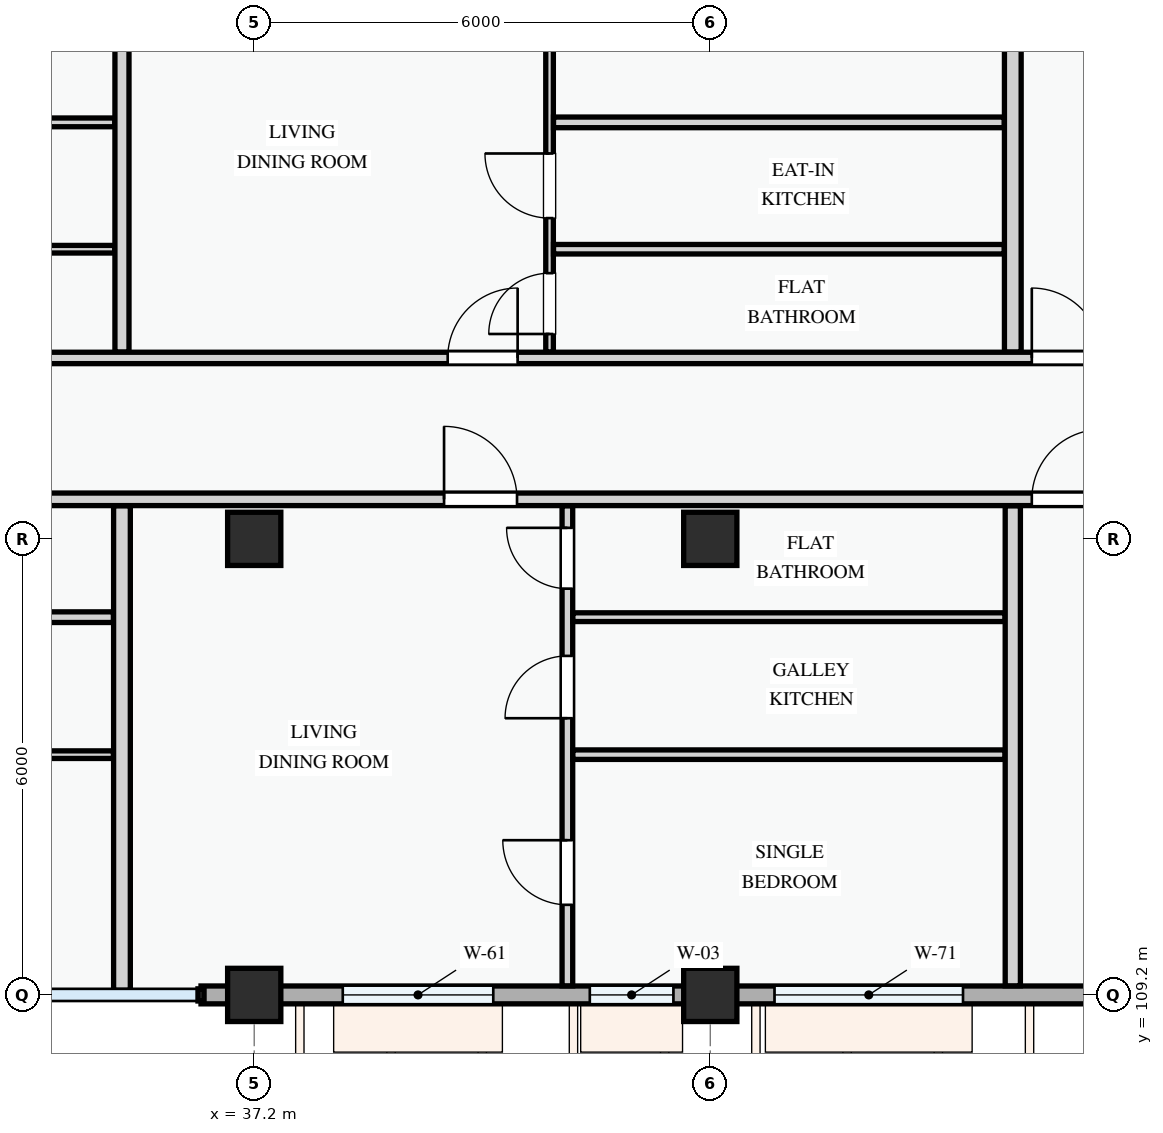
"""IFC4 building model, lengths in metres.
Left out: names, types, materials, properties, quantities, classifications, styles, units other than length and angle.
Written with IfcOpenShell. Run it as: python <this file> out.ifc"""

import sys

from ifc_helpers import new_model, si_unit, direction, frame, frame_2d, origin, origin_2d, place, context, subcontext, project, spatial, rectangle, extrude, element, fill, save


model = new_model("IFC4")
c1 = context("Model", 3, precision=1e-05, world=origin(), true_north=direction((0.0, 1.0)))
c2 = subcontext(c1, "Body", "Model", "MODEL_VIEW")
j1 = project(units=[si_unit("LENGTHUNIT", "METRE"), si_unit("PLANEANGLEUNIT", "RADIAN")], contexts=[c1])
p1 = place(None, origin())
s1 = spatial("IfcSite", under=j1, at=p1, CompositionType="ELEMENT")
p2 = place(p1, origin())
s2 = spatial("IfcBuilding", under=s1, at=p2, CompositionType="ELEMENT")
p3 = place(p2, frame((0.0, 0.0, 11.4)))
s3 = spatial("IfcBuildingStorey", under=s2, at=p3, CompositionType="ELEMENT", Elevation=11.4)
for number, where, z_axis, x_axis in (
    (1, (37.2, 109.2, 0.0), (0.0, 0.0, 1.0), (1.0, 0.0, 0.0)),
    (2, (37.2, 115.2, 0.0), (0.0, 0.0, 1.0), (1.0, 0.0, 0.0)),
    (3, (43.2, 109.2, 0.0), (0.0, 0.0, 1.0), (1.0, 0.0, 0.0)),
    (4, (43.2, 115.2, 0.0), (0.0, 0.0, 1.0), (1.0, 0.0, 0.0)),
):
    element("IfcColumn", number, at=place(p3, frame(where, z_axis=z_axis, x_axis=x_axis)), inside=s3, PredefinedType="COLUMN", context=c2, shape_type="SweptSolid", body=[
        extrude(rectangle(XDim=0.7, YDim=0.7, at=origin_2d()), origin(), (0.0, 0.0, 1.0), 3.3),
    ])
p4 = place(p3, frame((36.5, 109.2, 0.0), z_axis=(0.0, 0.0, 1.0), x_axis=(1.0, 0.0, 0.0)))
e5 = element("IfcWall", 5, at=p4, inside=s3, PredefinedType="STANDARD", context=c2, shape_type="SweptSolid", body=[
    extrude(rectangle(XDim=0.7, YDim=0.235, at=frame_2d((0.35, 0.0))), origin(), (0.0, 0.0, 1.0), 2.375),
])
p5 = place(p3, frame((37.2, 109.2, 0.0), z_axis=(0.0, 0.0, 1.0), x_axis=(1.0, 0.0, 0.0)))
e6 = element("IfcWall", 6, at=p5, inside=s3, PredefinedType="STANDARD", context=c2, shape_type="SweptSolid", body=[
    extrude(rectangle(XDim=6.0, YDim=0.235, at=frame_2d((3.0, 0.0))), origin(), (0.0, 0.0, 1.0), 2.475),
])
p6 = place(p5, frame((1.165, 0.0, 0.78)))
e7 = element("IfcOpeningElement", 7, at=p6, cuts=e6, PredefinedType="OPENING", context=c2, shape_type="SweptSolid", body=[
    extrude(rectangle(XDim=1.98, YDim=1.5, at=frame_2d((0.99, 0.75))), frame((0.0, 0.127, 0.0), z_axis=(0.0, -1.0, 0.0), x_axis=(1.0, 0.0, 0.0)), (0.0, 0.0, 1.0), 0.255),
])
p7 = place(p5, frame((4.415, 0.0, 0.78)))
e8 = element("IfcOpeningElement", 8, at=p7, cuts=e6, PredefinedType="OPENING", context=c2, shape_type="SweptSolid", body=[
    extrude(rectangle(XDim=1.1, YDim=1.3, at=frame_2d((0.55, 0.65))), frame((0.0, 0.127, 0.0), z_axis=(0.0, -1.0, 0.0), x_axis=(1.0, 0.0, 0.0)), (0.0, 0.0, 1.0), 0.255),
])
p8 = place(p3, frame((43.2, 109.2, 0.0), z_axis=(0.0, 0.0, 1.0), x_axis=(1.0, 0.0, 0.0)))
e9 = element("IfcWall", 9, at=p8, inside=s3, PredefinedType="STANDARD", context=c2, shape_type="SweptSolid", body=[
    extrude(rectangle(XDim=8.4, YDim=0.235, at=frame_2d((4.2, 0.0))), origin(), (0.0, 0.0, 1.0), 2.375),
])
p9 = place(p8, frame((0.845, 0.0, 0.78)))
e10 = element("IfcOpeningElement", 10, at=p9, cuts=e9, PredefinedType="OPENING", context=c2, shape_type="SweptSolid", body=[
    extrude(rectangle(XDim=2.48, YDim=1.46, at=frame_2d((1.24, 0.73))), frame((0.0, 0.127, 0.0), z_axis=(0.0, -1.0, 0.0), x_axis=(1.0, 0.0, 0.0)), (0.0, 0.0, 1.0), 0.255),
])
p10 = place(p8, frame((5.495, 0.0, 0.78)))
e11 = element("IfcOpeningElement", 11, at=p10, cuts=e9, PredefinedType="OPENING", context=c2, shape_type="SweptSolid", body=[
    extrude(rectangle(XDim=1.2, YDim=1.35, at=frame_2d((0.6, 0.675))), frame((0.0, 0.127, 0.0), z_axis=(0.0, -1.0, 0.0), x_axis=(1.0, 0.0, 0.0)), (0.0, 0.0, 1.0), 0.255),
])
p11 = place(p3, frame((30.665, 112.361, 0.0), z_axis=(0.0, 0.0, 1.0), x_axis=(1.0, 0.0, 0.0)))
e12 = element("IfcWall", 12, at=p11, inside=s3, PredefinedType="PARTITIONING", context=c2, shape_type="SweptSolid", body=[
    extrude(rectangle(XDim=4.683, YDim=0.1, at=frame_2d((2.342, 0.0))), origin(), (0.0, 0.0, 1.0), 3.0),
])
p12 = place(p3, frame((30.665, 114.17, 0.0), z_axis=(0.0, 0.0, 1.0), x_axis=(1.0, 0.0, 0.0)))
e13 = element("IfcWall", 13, at=p12, inside=s3, PredefinedType="PARTITIONING", context=c2, shape_type="SweptSolid", body=[
    extrude(rectangle(XDim=4.683, YDim=0.14, at=frame_2d((2.342, 0.0))), origin(), (0.0, 0.0, 1.0), 3.0),
])
p13 = place(p3, frame((30.663, 120.679, 0.0), z_axis=(0.0, 0.0, 1.0), x_axis=(1.0, 0.0, 0.0)))
e14 = element("IfcWall", 14, at=p13, inside=s3, PredefinedType="PARTITIONING", context=c2, shape_type="SweptSolid", body=[
    extrude(rectangle(XDim=4.702, YDim=0.115, at=frame_2d((2.351, 0.0))), origin(), (0.0, 0.0, 1.0), 3.0),
])
p14 = place(p3, frame((30.663, 119.01, 0.0), z_axis=(0.0, 0.0, 1.0), x_axis=(1.0, 0.0, 0.0)))
e15 = element("IfcWall", 15, at=p14, inside=s3, PredefinedType="PARTITIONING", context=c2, shape_type="SweptSolid", body=[
    extrude(rectangle(XDim=4.702, YDim=0.1, at=frame_2d((2.351, 0.0))), origin(), (0.0, 0.0, 1.0), 3.0),
])
p15 = place(p3, frame((41.32, 109.32, 0.0), z_axis=(0.0, 0.0, 1.0), x_axis=(0.0, 1.0, 0.0)))
e16 = element("IfcWall", 16, at=p15, inside=s3, PredefinedType="PARTITIONING", context=c2, shape_type="SweptSolid", body=[
    extrude(rectangle(XDim=6.316, YDim=0.14, at=frame_2d((3.158, 0.0))), origin(), (0.0, 0.0, 1.0), 3.0),
])
p16 = place(p15, frame((1.066, 0.0, 0.0)))
e17 = element("IfcOpeningElement", 17, at=p16, cuts=e16, PredefinedType="OPENING", context=c2, shape_type="SweptSolid", body=[
    extrude(rectangle(XDim=0.85, YDim=2.1, at=frame_2d((0.425, 1.05))), frame((0.0, 0.08, 0.0), z_axis=(0.0, -1.0, 0.0), x_axis=(1.0, 0.0, 0.0)), (0.0, 0.0, 1.0), 0.16),
])
p17 = place(p15, frame((3.521, 0.0, 0.0)))
e18 = element("IfcOpeningElement", 18, at=p17, cuts=e16, PredefinedType="OPENING", context=c2, shape_type="SweptSolid", body=[
    extrude(rectangle(XDim=0.82, YDim=2.08, at=frame_2d((0.41, 1.04))), frame((0.0, 0.08, 0.0), z_axis=(0.0, -1.0, 0.0), x_axis=(1.0, 0.0, 0.0)), (0.0, 0.0, 1.0), 0.16),
])
p18 = place(p15, frame((5.225, 0.0, 0.0)))
e19 = element("IfcOpeningElement", 19, at=p18, cuts=e16, PredefinedType="OPENING", context=c2, shape_type="SweptSolid", body=[
    extrude(rectangle(XDim=0.8, YDim=2.1, at=frame_2d((0.4, 1.05))), frame((0.0, 0.08, 0.0), z_axis=(0.0, -1.0, 0.0), x_axis=(1.0, 0.0, 0.0)), (0.0, 0.0, 1.0), 0.16),
])
p19 = place(p3, frame((41.392, 112.361, 0.0), z_axis=(0.0, 0.0, 1.0), x_axis=(1.0, 0.0, 0.0)))
e20 = element("IfcWall", 20, at=p19, inside=s3, PredefinedType="PARTITIONING", context=c2, shape_type="SweptSolid", body=[
    extrude(rectangle(XDim=5.686, YDim=0.125, at=frame_2d((2.843, 0.0))), origin(), (0.0, 0.0, 1.0), 3.0),
])
p20 = place(p3, frame((41.392, 114.17, 0.0), z_axis=(0.0, 0.0, 1.0), x_axis=(1.0, 0.0, 0.0)))
e21 = element("IfcWall", 21, at=p20, inside=s3, PredefinedType="PARTITIONING", context=c2, shape_type="SweptSolid", body=[
    extrude(rectangle(XDim=5.686, YDim=0.115, at=frame_2d((2.843, 0.0))), origin(), (0.0, 0.0, 1.0), 3.0),
])
p21 = place(p3, frame((41.086, 117.657, 0.0), z_axis=(0.0, 0.0, 1.0), x_axis=(0.0, 1.0, 0.0)))
e22 = element("IfcWall", 22, at=p21, inside=s3, PredefinedType="PARTITIONING", context=c2, shape_type="SweptSolid", body=[
    extrude(rectangle(XDim=5.823, YDim=0.1, at=frame_2d((2.912, 0.0))), origin(), (0.0, 0.0, 1.0), 3.0),
])
p22 = place(p21, frame((0.238, 0.0, 0.0)))
e23 = element("IfcOpeningElement", 23, at=p22, cuts=e22, PredefinedType="OPENING", context=c2, shape_type="SweptSolid", body=[
    extrude(rectangle(XDim=0.8, YDim=2.1, at=frame_2d((0.4, 1.05))), frame((0.0, 0.06, 0.0), z_axis=(0.0, -1.0, 0.0), x_axis=(1.0, 0.0, 0.0)), (0.0, 0.0, 1.0), 0.12),
])
p23 = place(p21, frame((1.763, 0.0, 0.0)))
e24 = element("IfcOpeningElement", 24, at=p23, cuts=e22, PredefinedType="OPENING", context=c2, shape_type="SweptSolid", body=[
    extrude(rectangle(XDim=0.85, YDim=2.1, at=frame_2d((0.425, 1.05))), frame((0.0, 0.06, 0.0), z_axis=(0.0, -1.0, 0.0), x_axis=(1.0, 0.0, 0.0)), (0.0, 0.0, 1.0), 0.12),
])
p24 = place(p21, frame((4.028, 0.0, 0.0)))
e25 = element("IfcOpeningElement", 25, at=p24, cuts=e22, PredefinedType="OPENING", context=c2, shape_type="SweptSolid", body=[
    extrude(rectangle(XDim=0.82, YDim=2.08, at=frame_2d((0.41, 1.04))), frame((0.0, 0.06, 0.0), z_axis=(0.0, -1.0, 0.0), x_axis=(1.0, 0.0, 0.0)), (0.0, 0.0, 1.0), 0.12),
])
p25 = place(p3, frame((41.138, 120.679, 0.0), z_axis=(0.0, 0.0, 1.0), x_axis=(1.0, 0.0, 0.0)))
e26 = element("IfcWall", 26, at=p25, inside=s3, PredefinedType="PARTITIONING", context=c2, shape_type="SweptSolid", body=[
    extrude(rectangle(XDim=5.93, YDim=0.14, at=frame_2d((2.965, 0.0))), origin(), (0.0, 0.0, 1.0), 3.0),
])
p26 = place(p3, frame((41.138, 119.01, 0.0), z_axis=(0.0, 0.0, 1.0), x_axis=(1.0, 0.0, 0.0)))
e27 = element("IfcWall", 27, at=p26, inside=s3, PredefinedType="PARTITIONING", context=c2, shape_type="SweptSolid", body=[
    extrude(rectangle(XDim=5.93, YDim=0.125, at=frame_2d((2.965, 0.0))), origin(), (0.0, 0.0, 1.0), 3.0),
])
p27 = place(p3, frame((35.46, 109.26, 0.0), z_axis=(0.0, 0.0, 1.0), x_axis=(0.0, 1.0, 0.0)))
e28 = element("IfcWall", 28, at=p27, inside=s3, PredefinedType="PARTITIONING", context=c2, shape_type="SweptSolid", body=[
    extrude(rectangle(XDim=6.375, YDim=0.22, at=frame_2d((3.188, 0.0))), origin(), (0.0, 0.0, 1.0), 3.0),
])
p28 = place(p3, frame((35.46, 117.657, 0.0), z_axis=(0.0, 0.0, 1.0), x_axis=(0.0, 1.0, 0.0)))
e29 = element("IfcWall", 29, at=p28, inside=s3, PredefinedType="PARTITIONING", context=c2, shape_type="SweptSolid", body=[
    extrude(rectangle(XDim=5.823, YDim=0.185, at=frame_2d((2.912, 0.0))), origin(), (0.0, 0.0, 1.0), 3.0),
])
p29 = place(p3, frame((47.18, 109.32, 0.0), z_axis=(0.0, 0.0, 1.0), x_axis=(0.0, 1.0, 0.0)))
e30 = element("IfcWall", 30, at=p29, inside=s3, PredefinedType="PARTITIONING", context=c2, shape_type="SweptSolid", body=[
    extrude(rectangle(XDim=6.316, YDim=0.2, at=frame_2d((3.158, 0.0))), origin(), (0.0, 0.0, 1.0), 2.585),
])
p30 = place(p3, frame((47.18, 117.657, 0.0), z_axis=(0.0, 0.0, 1.0), x_axis=(0.0, 1.0, 0.0)))
e31 = element("IfcWall", 31, at=p30, inside=s3, PredefinedType="PARTITIONING", context=c2, shape_type="SweptSolid", body=[
    extrude(rectangle(XDim=5.823, YDim=0.22, at=frame_2d((2.912, 0.0))), origin(), (0.0, 0.0, 1.0), 2.585),
])
p31 = place(p3, frame((25.15, 115.72, 0.0), z_axis=(0.0, 0.0, 1.0), x_axis=(1.0, 0.0, 0.0)))
e32 = element("IfcWall", 32, at=p31, inside=s3, PredefinedType="PARTITIONING", context=c2, shape_type="SweptSolid", body=[
    extrude(rectangle(XDim=32.331, YDim=0.165, at=frame_2d((16.165, 0.0))), origin(), (0.0, 0.0, 1.0), 3.0),
])
p32 = place(p31, frame((0.25, 0.0, 0.0)))
e33 = element("IfcOpeningElement", 33, at=p32, cuts=e32, PredefinedType="OPENING", context=c2, shape_type="SweptSolid", body=[
    extrude(rectangle(XDim=0.92, YDim=2.1, at=frame_2d((0.46, 1.05))), frame((0.0, 0.093, 0.0), z_axis=(0.0, -1.0, 0.0), x_axis=(1.0, 0.0, 0.0)), (0.0, 0.0, 1.0), 0.185),
])
p33 = place(p31, frame((14.548, 0.0, 0.0)))
e34 = element("IfcOpeningElement", 34, at=p33, cuts=e32, PredefinedType="OPENING", context=c2, shape_type="SweptSolid", body=[
    extrude(rectangle(XDim=0.96, YDim=2.12, at=frame_2d((0.48, 1.06))), frame((0.0, 0.093, 0.0), z_axis=(0.0, -1.0, 0.0), x_axis=(1.0, 0.0, 0.0)), (0.0, 0.0, 1.0), 0.185),
])
p34 = place(p31, frame((22.28, 0.0, 0.0)))
e35 = element("IfcOpeningElement", 35, at=p34, cuts=e32, PredefinedType="OPENING", context=c2, shape_type="SweptSolid", body=[
    extrude(rectangle(XDim=0.92, YDim=2.1, at=frame_2d((0.46, 1.05))), frame((0.0, 0.093, 0.0), z_axis=(0.0, -1.0, 0.0), x_axis=(1.0, 0.0, 0.0)), (0.0, 0.0, 1.0), 0.185),
])
p35 = place(p3, frame((22.66, 117.58, 0.0), z_axis=(0.0, 0.0, 1.0), x_axis=(1.0, 0.0, 0.0)))
e36 = element("IfcWall", 36, at=p35, inside=s3, PredefinedType="PARTITIONING", context=c2, shape_type="SweptSolid", body=[
    extrude(rectangle(XDim=34.88, YDim=0.15, at=frame_2d((17.44, 0.0))), origin(), (0.0, 0.0, 1.0), 3.0),
])
p36 = place(p35, frame((2.74, 0.0, 0.0)))
e37 = element("IfcOpeningElement", 37, at=p36, cuts=e36, PredefinedType="OPENING", context=c2, shape_type="SweptSolid", body=[
    extrude(rectangle(XDim=0.92, YDim=2.1, at=frame_2d((0.46, 1.05))), frame((0.0, 0.085, 0.0), z_axis=(0.0, -1.0, 0.0), x_axis=(1.0, 0.0, 0.0)), (0.0, 0.0, 1.0), 0.17),
])
p37 = place(p35, frame((17.085, 0.0, 0.0)))
e38 = element("IfcOpeningElement", 38, at=p37, cuts=e36, PredefinedType="OPENING", context=c2, shape_type="SweptSolid", body=[
    extrude(rectangle(XDim=0.92, YDim=2.1, at=frame_2d((0.46, 1.05))), frame((0.0, 0.085, 0.0), z_axis=(0.0, -1.0, 0.0), x_axis=(1.0, 0.0, 0.0)), (0.0, 0.0, 1.0), 0.17),
])
p38 = place(p35, frame((24.77, 0.0, 0.0)))
e39 = element("IfcOpeningElement", 39, at=p38, cuts=e36, PredefinedType="OPENING", context=c2, shape_type="SweptSolid", body=[
    extrude(rectangle(XDim=0.92, YDim=2.1, at=frame_2d((0.46, 1.05))), frame((0.0, 0.085, 0.0), z_axis=(0.0, -1.0, 0.0), x_axis=(1.0, 0.0, 0.0)), (0.0, 0.0, 1.0), 0.17),
])
p39 = place(p6, origin())
e40 = element("IfcWindow", 40, at=p39, inside=s3, PartitioningType="DOUBLE_PANEL_VERTICAL", PredefinedType="WINDOW", context=c2, shape_type="SweptSolid", body=[
    extrude(rectangle(XDim=1.98, YDim=1.5, at=frame_2d((0.99, 0.75))), frame((0.0, 0.03, 0.0), z_axis=(0.0, -1.0, 0.0), x_axis=(1.0, 0.0, 0.0)), (0.0, 0.0, 1.0), 0.06),
])
fill(e7, e40)
p40 = place(p7, origin())
e41 = element("IfcWindow", 41, at=p40, inside=s3, PartitioningType="SINGLE_PANEL", PredefinedType="WINDOW", context=c2, shape_type="SweptSolid", body=[
    extrude(rectangle(XDim=1.1, YDim=1.3, at=frame_2d((0.55, 0.65))), frame((0.0, 0.03, 0.0), z_axis=(0.0, -1.0, 0.0), x_axis=(1.0, 0.0, 0.0)), (0.0, 0.0, 1.0), 0.06),
])
fill(e8, e41)
p41 = place(p9, origin())
e42 = element("IfcWindow", 42, at=p41, inside=s3, PartitioningType="DOUBLE_PANEL_VERTICAL", PredefinedType="WINDOW", context=c2, shape_type="SweptSolid", body=[
    extrude(rectangle(XDim=2.48, YDim=1.46, at=frame_2d((1.24, 0.73))), frame((0.0, 0.03, 0.0), z_axis=(0.0, -1.0, 0.0), x_axis=(1.0, 0.0, 0.0)), (0.0, 0.0, 1.0), 0.06),
])
fill(e10, e42)
p42 = place(p16, origin())
e43 = element("IfcDoor", 43, at=p42, inside=s3, OperationType="SINGLE_SWING_RIGHT", PredefinedType="DOOR", context=c2, shape_type="SweptSolid", body=[
    extrude(rectangle(XDim=0.85, YDim=2.1, at=frame_2d((0.425, 1.05))), frame((0.0, 0.025, 0.0), z_axis=(0.0, -1.0, 0.0), x_axis=(1.0, 0.0, 0.0)), (0.0, 0.0, 1.0), 0.05),
])
fill(e17, e43)
p43 = place(p17, origin())
e44 = element("IfcDoor", 44, at=p43, inside=s3, OperationType="SINGLE_SWING_LEFT", PredefinedType="DOOR", context=c2, shape_type="SweptSolid", body=[
    extrude(rectangle(XDim=0.82, YDim=2.08, at=frame_2d((0.41, 1.04))), frame((0.0, 0.025, 0.0), z_axis=(0.0, -1.0, 0.0), x_axis=(1.0, 0.0, 0.0)), (0.0, 0.0, 1.0), 0.05),
])
fill(e18, e44)
p44 = place(p18, origin())
e45 = element("IfcDoor", 45, at=p44, inside=s3, OperationType="SINGLE_SWING_RIGHT", PredefinedType="DOOR", context=c2, shape_type="SweptSolid", body=[
    extrude(rectangle(XDim=0.8, YDim=2.1, at=frame_2d((0.4, 1.05))), frame((0.0, 0.025, 0.0), z_axis=(0.0, -1.0, 0.0), x_axis=(1.0, 0.0, 0.0)), (0.0, 0.0, 1.0), 0.05),
])
fill(e19, e45)
p45 = place(p22, origin())
e46 = element("IfcDoor", 46, at=p45, inside=s3, OperationType="SINGLE_SWING_LEFT", PredefinedType="DOOR", context=c2, shape_type="SweptSolid", body=[
    extrude(rectangle(XDim=0.8, YDim=2.1, at=frame_2d((0.4, 1.05))), frame((0.0, 0.025, 0.0), z_axis=(0.0, -1.0, 0.0), x_axis=(1.0, 0.0, 0.0)), (0.0, 0.0, 1.0), 0.05),
])
fill(e23, e46)
p46 = place(p23, origin())
e47 = element("IfcDoor", 47, at=p46, inside=s3, OperationType="SINGLE_SWING_RIGHT", PredefinedType="DOOR", context=c2, shape_type="SweptSolid", body=[
    extrude(rectangle(XDim=0.85, YDim=2.1, at=frame_2d((0.425, 1.05))), frame((0.0, 0.025, 0.0), z_axis=(0.0, -1.0, 0.0), x_axis=(1.0, 0.0, 0.0)), (0.0, 0.0, 1.0), 0.05),
])
fill(e24, e47)
p47 = place(p33, origin())
e48 = element("IfcDoor", 48, at=p47, inside=s3, OperationType="SINGLE_SWING_LEFT", PredefinedType="DOOR", context=c2, shape_type="SweptSolid", body=[
    extrude(rectangle(XDim=0.96, YDim=2.12, at=frame_2d((0.48, 1.06))), frame((0.0, 0.025, 0.0), z_axis=(0.0, -1.0, 0.0), x_axis=(1.0, 0.0, 0.0)), (0.0, 0.0, 1.0), 0.05),
])
fill(e34, e48)
p48 = place(p34, origin())
e49 = element("IfcDoor", 49, at=p48, inside=s3, OperationType="SINGLE_SWING_RIGHT", PredefinedType="DOOR", context=c2, shape_type="SweptSolid", body=[
    extrude(rectangle(XDim=0.92, YDim=2.1, at=frame_2d((0.46, 1.05))), frame((0.0, 0.025, 0.0), z_axis=(0.0, -1.0, 0.0), x_axis=(1.0, 0.0, 0.0)), (0.0, 0.0, 1.0), 0.05),
])
fill(e35, e49)
p49 = place(p37, origin())
e50 = element("IfcDoor", 50, at=p49, inside=s3, OperationType="SINGLE_SWING_RIGHT", PredefinedType="DOOR", context=c2, shape_type="SweptSolid", body=[
    extrude(rectangle(XDim=0.92, YDim=2.1, at=frame_2d((0.46, 1.05))), frame((0.0, 0.025, 0.0), z_axis=(0.0, -1.0, 0.0), x_axis=(1.0, 0.0, 0.0)), (0.0, 0.0, 1.0), 0.05),
])
fill(e38, e50)
p50 = place(p38, origin())
e51 = element("IfcDoor", 51, at=p50, inside=s3, OperationType="SINGLE_SWING_LEFT", PredefinedType="DOOR", context=c2, shape_type="SweptSolid", body=[
    extrude(rectangle(XDim=0.92, YDim=2.1, at=frame_2d((0.46, 1.05))), frame((0.0, 0.025, 0.0), z_axis=(0.0, -1.0, 0.0), x_axis=(1.0, 0.0, 0.0)), (0.0, 0.0, 1.0), 0.05),
])
fill(e39, e51)
save(model, sys.argv[1])
